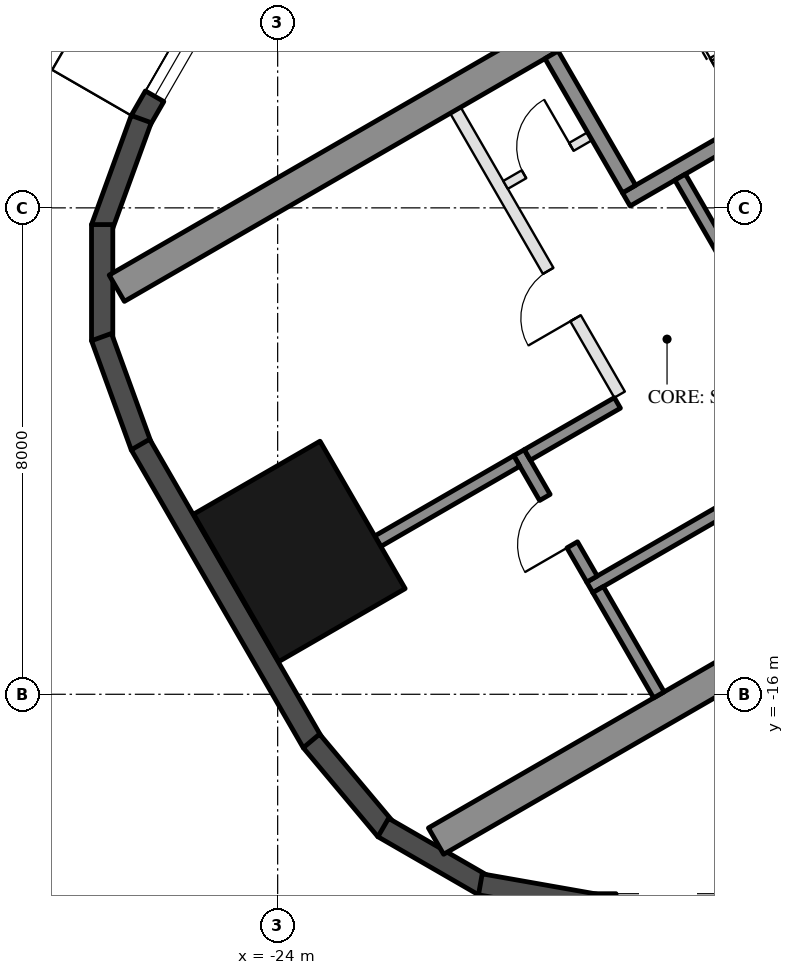
"""IFC4 building model, lengths in metres.
Left out: names, types, materials, properties, quantities, classifications, styles, units other than length and angle.
Written with IfcOpenShell. Run it as: python <this file> out.ifc"""

import sys

from ifc_helpers import new_model, si_unit, direction, frame, frame_2d, origin, origin_2d, place, context, subcontext, project, spatial, rectangle, hollow_rectangle, extrude, element, fill, save


model = new_model("IFC4")
c1 = context("Model", 3, precision=1e-05, world=origin(), true_north=direction((0.0, 1.0)))
c2 = subcontext(c1, "Body", "Model", "MODEL_VIEW")
j1 = project(units=[si_unit("LENGTHUNIT", "METRE"), si_unit("PLANEANGLEUNIT", "RADIAN")], contexts=[c1])
p1 = place(None, origin())
s1 = spatial("IfcSite", under=j1, at=p1, CompositionType="ELEMENT")
p2 = place(p1, origin())
s2 = spatial("IfcBuilding", under=s1, at=p2, CompositionType="ELEMENT")
p3 = place(p2, frame((0.0, 0.0, 57.6)))
s3 = spatial("IfcBuildingStorey", under=s2, at=p3, CompositionType="ELEMENT", Elevation=57.6)
p4 = place(p3, frame((-23.643, -13.65, 0.0), z_axis=(0.0, 0.0, 1.0), x_axis=(-0.5, 0.866025403784, 0.0)))
e1 = element("IfcColumn", 1, at=p4, inside=s3, PredefinedType="COLUMN", context=c2, shape_type="SweptSolid", body=[
    extrude(hollow_rectangle(XDim=2.8, YDim=2.4, WallThickness=0.07, at=origin_2d()), origin(), (0.0, 0.0, 1.0), 3.7),
])
p5 = place(p3, frame((-24.299, -3.176, 0.0), z_axis=(0.0, 0.0, 1.0), x_axis=(-0.500028278809, -0.866009076391, 0.0)))
e2 = element("IfcWall", 2, at=p5, inside=s3, PredefinedType="SOLIDWALL", context=c2, shape_type="SweptSolid", body=[
    extrude(rectangle(XDim=3.916, YDim=0.35, at=frame_2d((1.958, 0.0))), origin(), (0.0, 0.0, 1.0), 3.55),
])
p6 = place(p5, frame((1.75, 0.0, 0.3)))
e3 = element("IfcOpeningElement", 3, at=p6, cuts=e2, PredefinedType="OPENING", context=c2, shape_type="SweptSolid", body=[
    extrude(rectangle(XDim=1.7, YDim=2.65, at=frame_2d((0.85, 1.325))), frame((0.0, 0.185, 0.0), z_axis=(0.0, -1.0, 0.0), x_axis=(1.0, 0.0, 0.0)), (0.0, 0.0, 1.0), 0.37),
])
for number, where, z_axis, x_axis in (
    (4, (-26.244, -6.54, 0.0), (0.0, 0.0, 1.0), (-0.342, -0.94, 0.0)),
    (5, (-26.886, -8.275, 0.0), (0.0, 0.0, 1.0), (0.0, -1.0, 0.0)),
    (6, (-26.897, -10.125, 0.0), (0.0, 0.0, 1.0), (0.342, -0.94, 0.0)),
):
    element("IfcWall", number, at=place(p3, frame(where, z_axis=z_axis, x_axis=x_axis)), inside=s3, PredefinedType="SOLIDWALL", context=c2, shape_type="SweptSolid", body=[
        extrude(rectangle(XDim=1.91, YDim=0.35, at=frame_2d((0.955, 0.0))), origin(), (0.0, 0.0, 1.0), 3.55),
    ])
p7 = place(p3, frame((-26.257, -11.893, 0.0), z_axis=(0.0, 0.0, 1.0), x_axis=(0.500018773155, -0.866014564827, 0.0)))
e7 = element("IfcWall", 7, at=p7, inside=s3, PredefinedType="SOLIDWALL", context=c2, shape_type="SweptSolid", body=[
    extrude(rectangle(XDim=5.658, YDim=0.35, at=frame_2d((2.829, 0.0))), origin(), (0.0, 0.0, 1.0), 3.55),
])
for number, where, z_axis, x_axis in (
    (8, (-23.445, -16.768, 0.0), (0.0, 0.0, 1.0), (0.643, -0.766, 0.0)),
    (9, (-22.264, -18.192, 0.0), (0.0, 0.0, 1.0), (0.866, -0.5, 0.0)),
):
    element("IfcWall", number, at=place(p3, frame(where, z_axis=z_axis, x_axis=x_axis)), inside=s3, PredefinedType="SOLIDWALL", context=c2, shape_type="SweptSolid", body=[
        extrude(rectangle(XDim=1.91, YDim=0.35, at=frame_2d((0.955, 0.0))), origin(), (0.0, 0.0, 1.0), 3.55),
    ])
p8 = place(p3, frame((-20.667, -19.126, 0.0), z_axis=(0.0, 0.0, 1.0), x_axis=(0.984798995425, -0.173697837091, 0.0)))
e10 = element("IfcWall", 10, at=p8, inside=s3, PredefinedType="SOLIDWALL", context=c2, shape_type="SweptSolid", body=[
    extrude(rectangle(XDim=1.91, YDim=0.35, at=frame_2d((0.955, 0.0))), origin(), (0.0, 0.0, 1.0), 3.55),
])
p9 = place(p3, frame((-18.816, -19.455, 0.0), z_axis=(0.0, 0.0, 1.0), x_axis=(1.0, 0.0, 0.0)))
e11 = element("IfcWall", 11, at=p9, inside=s3, PredefinedType="SOLIDWALL", context=c2, shape_type="SweptSolid", body=[
    extrude(rectangle(XDim=11.816, YDim=0.35, at=frame_2d((5.908, 0.0))), origin(), (0.0, 0.0, 1.0), 3.55),
])
p10 = place(p9, frame((0.381, 0.0, 0.3)))
e12 = element("IfcOpeningElement", 12, at=p10, cuts=e11, PredefinedType="OPENING", context=c2, shape_type="SweptSolid", body=[
    extrude(rectangle(XDim=1.7, YDim=2.65, at=frame_2d((0.85, 1.325))), frame((0.0, 0.185, 0.0), z_axis=(0.0, -1.0, 0.0), x_axis=(1.0, 0.0, 0.0)), (0.0, 0.0, 1.0), 0.37),
])
p11 = place(p9, frame((7.665, 0.0, 0.0)))
e13 = element("IfcOpeningElement", 13, at=p11, cuts=e11, PredefinedType="OPENING", context=c2, shape_type="SweptSolid", body=[
    extrude(rectangle(XDim=2.4, YDim=2.4, at=frame_2d((1.2, 1.2))), frame((0.0, 0.185, 0.0), z_axis=(0.0, -1.0, 0.0), x_axis=(1.0, 0.0, 0.0)), (0.0, 0.0, 1.0), 0.37),
])
p12 = place(p9, frame((3.866, 0.0, 0.3)))
e14 = element("IfcOpeningElement", 14, at=p12, cuts=e11, PredefinedType="OPENING", context=c2, shape_type="SweptSolid", body=[
    extrude(rectangle(XDim=1.5, YDim=2.65, at=frame_2d((0.75, 1.325))), frame((0.0, 0.185, 0.0), z_axis=(0.0, -1.0, 0.0), x_axis=(1.0, 0.0, 0.0)), (0.0, 0.0, 1.0), 0.37),
])
p13 = place(p9, frame((5.666, 0.0, 0.3)))
e15 = element("IfcOpeningElement", 15, at=p13, cuts=e11, PredefinedType="OPENING", context=c2, shape_type="SweptSolid", body=[
    extrude(rectangle(XDim=1.5, YDim=2.65, at=frame_2d((0.75, 1.325))), frame((0.0, 0.185, 0.0), z_axis=(0.0, -1.0, 0.0), x_axis=(1.0, 0.0, 0.0)), (0.0, 0.0, 1.0), 0.37),
])
for number, where, z_axis, x_axis in (
    (16, (-13.797, -1.903, 0.0), (0.0, 0.0, 1.0), (-0.866, -0.5, 0.0)),
    (17, (-8.547, -10.997, 0.0), (0.0, 0.0, 1.0), (-0.866, -0.5, 0.0)),
):
    element("IfcWall", number, at=place(p3, frame(where, z_axis=z_axis, x_axis=x_axis)), inside=s3, PredefinedType="SHEAR", context=c2, shape_type="SweptSolid", body=[
        extrude(rectangle(XDim=14.837, YDim=0.5, at=frame_2d((7.418, 0.0))), origin(), (0.0, 0.0, 1.0), 3.5),
    ])
p14 = place(p3, frame((-12.681, -4.636, 0.0), z_axis=(0.0, 0.0, 1.0), x_axis=(-0.866021702275, -0.500006411147, 0.0)))
e18 = element("IfcWall", 18, at=p14, inside=s3, PredefinedType="SHEAR", context=c2, shape_type="SweptSolid", body=[
    extrude(rectangle(XDim=6.45, YDim=0.25, at=frame_2d((3.225, 0.0))), origin(), (0.0, 0.0, 1.0), 3.5),
])
p15 = place(p14, frame((0.3, 0.0, 0.0)))
e19 = element("IfcOpeningElement", 19, at=p15, cuts=e18, PredefinedType="OPENING", context=c2, shape_type="SweptSolid", body=[
    extrude(rectangle(XDim=1.0, YDim=2.1, at=frame_2d((0.5, 1.05))), frame((0.0, 0.135, 0.0), z_axis=(0.0, -1.0, 0.0), x_axis=(1.0, 0.0, 0.0)), (0.0, 0.0, 1.0), 0.27),
])
p16 = place(p3, frame((-19.496, -5.482, 0.0), z_axis=(0.0, 0.0, 1.0), x_axis=(0.499990435942, -0.866030925526, 0.0)))
e20 = element("IfcWall", 20, at=p16, inside=s3, PredefinedType="SHEAR", context=c2, shape_type="SweptSolid", body=[
    extrude(rectangle(XDim=2.55, YDim=0.25, at=frame_2d((1.275, 0.0))), origin(), (0.0, 0.0, 1.0), 3.5),
])
p17 = place(p3, frame((-17.381, -7.495, 0.0), z_axis=(0.0, 0.0, 1.0), x_axis=(0.500011755427, -0.866018616679, 0.0)))
e21 = element("IfcWall", 21, at=p17, inside=s3, PredefinedType="SHEAR", context=c2, shape_type="SweptSolid", body=[
    extrude(rectangle(XDim=2.8, YDim=0.2, at=frame_2d((1.4, 0.0))), origin(), (0.0, 0.0, 1.0), 3.5),
])
p18 = place(p3, frame((-10.068, -9.162, 0.0), z_axis=(0.0, 0.0, 1.0), x_axis=(-0.866032725843, -0.499987317609, 0.0)))
e22 = element("IfcWall", 22, at=p18, inside=s3, PredefinedType="SHEAR", context=c2, shape_type="SweptSolid", body=[
    extrude(rectangle(XDim=10.16, YDim=0.2, at=frame_2d((5.08, 0.0))), origin(), (0.0, 0.0, 1.0), 3.5),
])
p19 = place(p18, frame((0.72, 0.0, 0.0)))
e23 = element("IfcOpeningElement", 23, at=p19, cuts=e22, PredefinedType="OPENING", context=c2, shape_type="SweptSolid", body=[
    extrude(rectangle(XDim=0.9, YDim=2.1, at=frame_2d((0.45, 1.05))), frame((0.0, 0.11, 0.0), z_axis=(0.0, -1.0, 0.0), x_axis=(1.0, 0.0, 0.0)), (0.0, 0.0, 1.0), 0.22),
])
p20 = place(p18, frame((5.8, 0.0, 0.0)))
e24 = element("IfcOpeningElement", 24, at=p20, cuts=e22, PredefinedType="OPENING", context=c2, shape_type="SweptSolid", body=[
    extrude(rectangle(XDim=0.9, YDim=2.1, at=frame_2d((0.45, 1.05))), frame((0.0, 0.11, 0.0), z_axis=(0.0, -1.0, 0.0), x_axis=(1.0, 0.0, 0.0)), (0.0, 0.0, 1.0), 0.22),
])
p21 = place(p3, frame((-20.031, -12.026, 0.0), z_axis=(0.0, 0.0, 1.0), x_axis=(0.500033551112, -0.866006032174, 0.0)))
e25 = element("IfcWall", 25, at=p21, inside=s3, PredefinedType="SHEAR", context=c2, shape_type="SweptSolid", body=[
    extrude(rectangle(XDim=2.4, YDim=0.2, at=frame_2d((1.2, 0.0))), origin(), (0.0, 0.0, 1.0), 3.5),
])
p22 = place(p21, frame((0.85, 0.0, 0.0)))
e26 = element("IfcOpeningElement", 26, at=p22, cuts=e25, PredefinedType="OPENING", context=c2, shape_type="SweptSolid", body=[
    extrude(rectangle(XDim=0.9, YDim=2.1, at=frame_2d((0.45, 1.05))), frame((0.0, 0.11, 0.0), z_axis=(0.0, -1.0, 0.0), x_axis=(1.0, 0.0, 0.0)), (0.0, 0.0, 1.0), 0.22),
])
p23 = place(p3, frame((-18.413, -11.208, 0.0), z_axis=(0.0, 0.0, 1.0), x_axis=(-0.866038183914, -0.499977863513, 0.0)))
e27 = element("IfcWall", 27, at=p23, inside=s3, PredefinedType="SHEAR", context=c2, shape_type="SweptSolid", body=[
    extrude(rectangle(XDim=1.71, YDim=0.2, at=frame_2d((0.855, 0.0))), origin(), (0.0, 0.0, 1.0), 3.5),
])
p24 = place(p3, frame((-18.73, -14.278, 0.0), z_axis=(0.0, 0.0, 1.0), x_axis=(0.50002537861, -0.866010750942, 0.0)))
e28 = element("IfcWall", 28, at=p24, inside=s3, PredefinedType="SHEAR", context=c2, shape_type="SweptSolid", body=[
    extrude(rectangle(XDim=2.0, YDim=0.2, at=frame_2d((1.0, 0.0))), origin(), (0.0, 0.0, 1.0), 3.5),
])
p25 = place(p3, frame((-20.067, -12.163, 0.0), z_axis=(0.0, 0.0, 1.0), x_axis=(-0.866060851709, -0.499938597367, 0.0)))
e29 = element("IfcWall", 29, at=p25, inside=s3, PredefinedType="SHEAR", context=c2, shape_type="SweptSolid", body=[
    extrude(rectangle(XDim=2.64, YDim=0.2, at=frame_2d((1.32, 0.0))), origin(), (0.0, 0.0, 1.0), 3.5),
])
p26 = place(p3, frame((-21.076, -6.395, 0.0), z_axis=(0.0, 0.0, 1.0), x_axis=(0.50001468107, -0.866016927499, 0.0)))
e30 = element("IfcWall", 30, at=p26, inside=s3, PredefinedType="PARTITIONING", context=c2, shape_type="SweptSolid", body=[
    extrude(rectangle(XDim=5.4, YDim=0.2, at=frame_2d((2.7, 0.0))), origin(), (0.0, 0.0, 1.0), 3.5),
])
p27 = place(p26, frame((3.05, 0.0, 0.0)))
e31 = element("IfcOpeningElement", 31, at=p27, cuts=e30, PredefinedType="OPENING", context=c2, shape_type="SweptSolid", body=[
    extrude(rectangle(XDim=0.9, YDim=2.1, at=frame_2d((0.45, 1.05))), frame((0.0, 0.11, 0.0), z_axis=(0.0, -1.0, 0.0), x_axis=(1.0, 0.0, 0.0)), (0.0, 0.0, 1.0), 0.22),
])
p28 = place(p3, frame((-18.866, -6.822, 0.0), z_axis=(0.0, 0.0, 1.0), x_axis=(-0.866028054938, -0.499995408039, 0.0)))
e32 = element("IfcWall", 32, at=p28, inside=s3, PredefinedType="PARTITIONING", context=c2, shape_type="SweptSolid", body=[
    extrude(rectangle(XDim=1.6, YDim=0.15, at=frame_2d((0.8, 0.0))), origin(), (0.0, 0.0, 1.0), 3.5),
])
p29 = place(p28, frame((0.35, 0.0, 0.0)))
e33 = element("IfcOpeningElement", 33, at=p29, cuts=e32, PredefinedType="OPENING", context=c2, shape_type="SweptSolid", body=[
    extrude(rectangle(XDim=0.9, YDim=2.1, at=frame_2d((0.45, 1.05))), frame((0.0, 0.085, 0.0), z_axis=(0.0, -1.0, 0.0), x_axis=(1.0, 0.0, 0.0)), (0.0, 0.0, 1.0), 0.17),
])
p30 = place(p6, origin())
e34 = element("IfcWindow", 34, at=p30, inside=s3, PartitioningType="SINGLE_PANEL", PredefinedType="WINDOW", context=c2, shape_type="SweptSolid", body=[
    extrude(rectangle(XDim=1.7, YDim=2.65, at=frame_2d((0.85, 1.325))), frame((0.0, 0.03, 0.0), z_axis=(0.0, -1.0, 0.0), x_axis=(1.0, 0.0, 0.0)), (0.0, 0.0, 1.0), 0.06),
])
fill(e3, e34)
p31 = place(p29, frame((0.9, 0.0, 0.0), z_axis=(0.0, 0.0, 1.0), x_axis=(-1.0, 0.0, 0.0)))
e35 = element("IfcDoor", 35, at=p31, inside=s3, OperationType="SINGLE_SWING_RIGHT", PredefinedType="DOOR", context=c2, shape_type="SweptSolid", body=[
    extrude(rectangle(XDim=0.9, YDim=2.1, at=frame_2d((0.45, 1.05))), frame((0.0, 0.025, 0.0), z_axis=(0.0, -1.0, 0.0), x_axis=(1.0, 0.0, 0.0)), (0.0, 0.0, 1.0), 0.05),
])
fill(e33, e35)
p32 = place(p22, frame((0.9, 0.0, 0.0), z_axis=(0.0, 0.0, 1.0), x_axis=(-1.0, 0.0, 0.0)))
e36 = element("IfcDoor", 36, at=p32, inside=s3, OperationType="SINGLE_SWING_LEFT", PredefinedType="DOOR", context=c2, shape_type="SweptSolid", body=[
    extrude(rectangle(XDim=0.9, YDim=2.1, at=frame_2d((0.45, 1.05))), frame((0.0, 0.025, 0.0), z_axis=(0.0, -1.0, 0.0), x_axis=(1.0, 0.0, 0.0)), (0.0, 0.0, 1.0), 0.05),
])
fill(e26, e36)
p33 = place(p27, frame((0.9, 0.0, 0.0), z_axis=(0.0, 0.0, 1.0), x_axis=(-1.0, 0.0, 0.0)))
e37 = element("IfcDoor", 37, at=p33, inside=s3, OperationType="SINGLE_SWING_LEFT", PredefinedType="DOOR", context=c2, shape_type="SweptSolid", body=[
    extrude(rectangle(XDim=0.9, YDim=2.1, at=frame_2d((0.45, 1.05))), frame((0.0, 0.025, 0.0), z_axis=(0.0, -1.0, 0.0), x_axis=(1.0, 0.0, 0.0)), (0.0, 0.0, 1.0), 0.05),
])
fill(e31, e37)
save(model, sys.argv[1])
